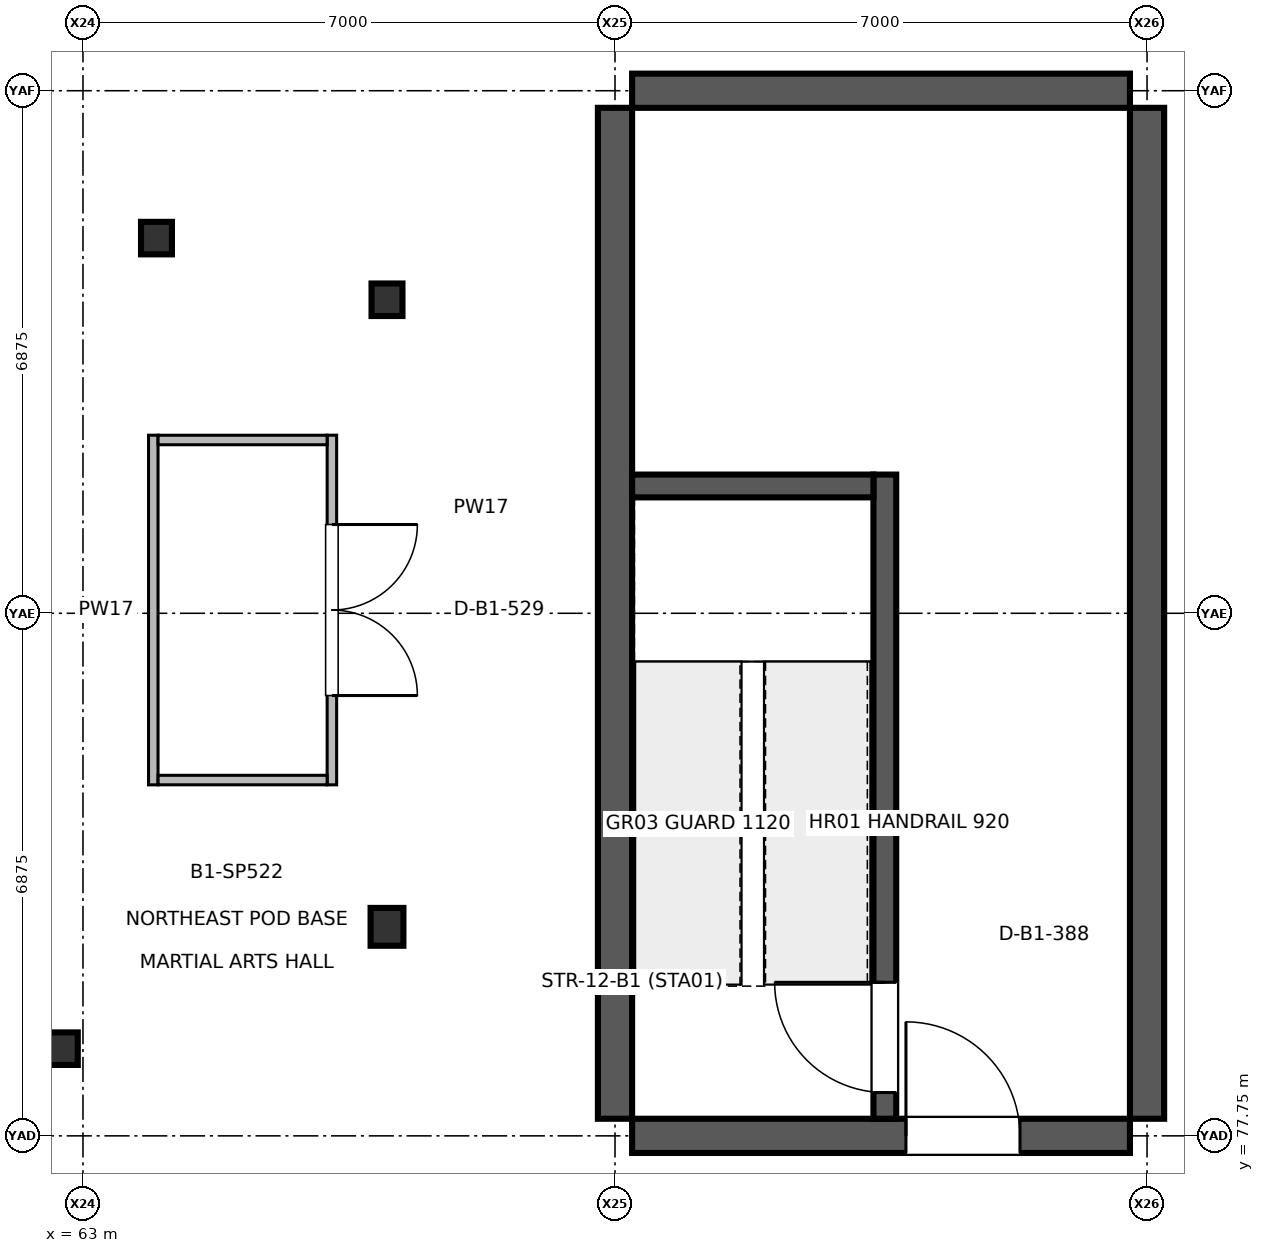
"""IFC4 building model, lengths in metres.
Left out: names, types, materials, properties, quantities, classifications, styles, units other than length and angle.
Written with IfcOpenShell. Run it as: python <this file> out.ifc"""

import sys

from ifc_helpers import new_model, si_unit, direction, frame, frame_2d, origin, origin_2d, place, context, subcontext, project, spatial, rectangle, i_section, extrude, element, fill, save


model = new_model("IFC4")
c1 = context("Model", 3, precision=1e-05, world=origin(), true_north=direction((0.0, 1.0)))
c2 = subcontext(c1, "Body", "Model", "MODEL_VIEW")
j1 = project(units=[si_unit("LENGTHUNIT", "METRE"), si_unit("PLANEANGLEUNIT", "RADIAN")], contexts=[c1])
p1 = place(None, origin())
s1 = spatial("IfcSite", under=j1, at=p1, CompositionType="ELEMENT")
p2 = place(p1, origin())
s2 = spatial("IfcBuilding", under=s1, at=p2, CompositionType="ELEMENT")
p3 = place(p2, frame((0.0, 0.0, -6.0)))
s3 = spatial("IfcBuildingStorey", under=s2, at=p3, CompositionType="ELEMENT", Elevation=-6.0)
p4 = place(p3, frame((67.0, 80.5, 0.0), z_axis=(0.0, 0.0, 1.0), x_axis=(1.0, 0.0, 0.0)))
e1 = element("IfcColumn", 1, at=p4, inside=s3, PredefinedType="COLUMN", context=c2, shape_type="SweptSolid", body=[
    extrude(i_section(OverallWidth=0.432, OverallDepth=0.498, WebThickness=0.024, FlangeThickness=0.038, at=origin_2d()), origin(), (0.0, 0.0, 1.0), 5.998),
])
p5 = place(p3, frame((67.0, 88.75, 0.0), z_axis=(0.0, 0.0, 1.0), x_axis=(1.0, 0.0, 0.0)))
e2 = element("IfcColumn", 2, at=p5, inside=s3, PredefinedType="COLUMN", context=c2, shape_type="SweptSolid", body=[
    extrude(i_section(OverallWidth=0.407, OverallDepth=0.428, WebThickness=0.02, FlangeThickness=0.035, at=origin_2d()), origin(), (0.0, 0.0, 1.0), 5.998),
])
for number, where, z_axis, x_axis in (
    (3, (63.967, 89.561, 0.0), (0.0, 0.0, 1.0), (1.0, 0.0, 0.0)),
    (4, (62.728, 78.897, 0.0), (0.0, 0.0, 1.0), (1.0, 0.0, 0.0)),
):
    element("IfcColumn", number, at=place(p3, frame(where, z_axis=z_axis, x_axis=x_axis)), inside=s3, PredefinedType="COLUMN", context=c2, shape_type="SweptSolid", body=[
        extrude(i_section(OverallWidth=0.407, OverallDepth=0.428, WebThickness=0.02, FlangeThickness=0.035, at=origin_2d()), origin(), (0.0, 0.0, 1.0), 5.718),
    ])
for number, where, z_axis, x_axis in (
    (5, (70.0, 77.975, 0.0), (0.0, 0.0, 1.0), (0.0, 1.0, 0.0)),
    (6, (77.0, 77.975, 0.0), (0.0, 0.0, 1.0), (0.0, 1.0, 0.0)),
):
    element("IfcWall", number, at=place(p3, frame(where, z_axis=z_axis, x_axis=x_axis)), inside=s3, PredefinedType="SHEAR", context=c2, shape_type="SweptSolid", body=[
        extrude(rectangle(XDim=13.3, YDim=0.45, at=frame_2d((6.65, 0.0))), origin(), (0.0, 0.0, 1.0), 5.72),
    ])
p6 = place(p3, frame((70.225, 77.75, 0.0), z_axis=(0.0, 0.0, 1.0), x_axis=(1.0, 0.0, 0.0)))
e7 = element("IfcWall", 7, at=p6, inside=s3, PredefinedType="SHEAR", context=c2, shape_type="SweptSolid", body=[
    extrude(rectangle(XDim=6.55, YDim=0.45, at=frame_2d((3.275, 0.0))), origin(), (0.0, 0.0, 1.0), 5.72),
])
p7 = place(p6, frame((3.603, 0.0, 0.0)))
e8 = element("IfcOpeningElement", 8, at=p7, cuts=e7, PredefinedType="OPENING", context=c2, shape_type="SweptSolid", body=[
    extrude(rectangle(XDim=1.5, YDim=2.2, at=frame_2d((0.75, 1.1))), frame((0.0, 0.235, 0.0), z_axis=(0.0, -1.0, 0.0), x_axis=(1.0, 0.0, 0.0)), (0.0, 0.0, 1.0), 0.47),
])
p8 = place(p3, frame((70.225, 91.5, 0.0), z_axis=(0.0, 0.0, 1.0), x_axis=(1.0, 0.0, 0.0)))
e9 = element("IfcWall", 9, at=p8, inside=s3, PredefinedType="SHEAR", context=c2, shape_type="SweptSolid", body=[
    extrude(rectangle(XDim=6.55, YDim=0.45, at=frame_2d((3.275, 0.0))), origin(), (0.0, 0.0, 1.0), 5.72),
])
p9 = place(p3, frame((73.55, 77.975, 0.0), z_axis=(0.0, 0.0, 1.0), x_axis=(0.0, 1.0, 0.0)))
e10 = element("IfcWall", 10, at=p9, inside=s3, PredefinedType="SHEAR", context=c2, shape_type="SweptSolid", body=[
    extrude(rectangle(XDim=8.475, YDim=0.3, at=frame_2d((4.237, 0.0))), origin(), (0.0, 0.0, 1.0), 5.72),
])
p10 = place(p9, frame((0.345, 0.0, 0.0)))
e11 = element("IfcOpeningElement", 11, at=p10, cuts=e10, PredefinedType="OPENING", context=c2, shape_type="SweptSolid", body=[
    extrude(rectangle(XDim=1.45, YDim=2.2, at=frame_2d((0.725, 1.1))), frame((0.0, 0.16, 0.0), z_axis=(0.0, -1.0, 0.0), x_axis=(1.0, 0.0, 0.0)), (0.0, 0.0, 1.0), 0.32),
])
p11 = place(p3, frame((66.275, 86.968, 0.0), z_axis=(0.0, 0.0, 1.0), x_axis=(0.0, -1.0, 0.0)))
e12 = element("IfcWall", 12, at=p11, inside=s3, PredefinedType="PARTITIONING", context=c2, shape_type="SweptSolid", body=[
    extrude(rectangle(XDim=4.6, YDim=0.125, at=frame_2d((2.3, 0.0))), origin(), (0.0, 0.0, 1.0), 5.02),
])
p12 = place(p11, frame((1.175, 0.0, 0.0)))
e13 = element("IfcOpeningElement", 13, at=p12, cuts=e12, PredefinedType="OPENING", context=c2, shape_type="SweptSolid", body=[
    extrude(rectangle(XDim=2.25, YDim=2.45, at=frame_2d((1.125, 1.225))), frame((0.0, 0.073, 0.0), z_axis=(0.0, -1.0, 0.0), x_axis=(1.0, 0.0, 0.0)), (0.0, 0.0, 1.0), 0.145),
])
p13 = place(p3, frame((63.925, 82.368, 0.0), z_axis=(0.0, 0.0, 1.0), x_axis=(0.0, 1.0, 0.0)))
e14 = element("IfcWall", 14, at=p13, inside=s3, PredefinedType="PARTITIONING", context=c2, shape_type="SweptSolid", body=[
    extrude(rectangle(XDim=4.6, YDim=0.125, at=frame_2d((2.3, 0.0))), origin(), (0.0, 0.0, 1.0), 5.02),
])
for number, where, z_axis, x_axis in (
    (15, (63.988, 82.431, 0.0), (0.0, 0.0, 1.0), (1.0, 0.0, 0.0)),
    (16, (63.988, 86.905, 0.0), (0.0, 0.0, 1.0), (1.0, 0.0, 0.0)),
):
    element("IfcWall", number, at=place(p3, frame(where, z_axis=z_axis, x_axis=x_axis)), inside=s3, PredefinedType="PARTITIONING", context=c2, shape_type="SweptSolid", body=[
        extrude(rectangle(XDim=2.224, YDim=0.125, at=frame_2d((1.112, 0.0))), origin(), (0.0, 0.0, 1.0), 5.02),
    ])
p14 = place(p3, frame((70.225, 86.3, 0.0), z_axis=(0.0, 0.0, 1.0), x_axis=(1.0, 0.0, 0.0)))
e17 = element("IfcWall", 17, at=p14, inside=s3, PredefinedType="SHEAR", context=c2, shape_type="SweptSolid", body=[
    extrude(rectangle(XDim=3.175, YDim=0.3, at=frame_2d((1.587, 0.0))), origin(), (0.0, 0.0, 1.0), 5.72),
])
p15 = place(p7, origin())
e18 = element("IfcDoor", 18, at=p15, inside=s3, OperationType="SINGLE_SWING_LEFT", PredefinedType="DOOR", context=c2, shape_type="SweptSolid", body=[
    extrude(rectangle(XDim=1.5, YDim=2.2, at=frame_2d((0.75, 1.1))), frame((0.0, 0.025, 0.0), z_axis=(0.0, -1.0, 0.0), x_axis=(1.0, 0.0, 0.0)), (0.0, 0.0, 1.0), 0.05),
])
fill(e8, e18)
p16 = place(p10, origin())
e19 = element("IfcDoor", 19, at=p16, inside=s3, OperationType="SINGLE_SWING_RIGHT", PredefinedType="DOOR", context=c2, shape_type="SweptSolid", body=[
    extrude(rectangle(XDim=1.45, YDim=2.2, at=frame_2d((0.725, 1.1))), frame((0.0, 0.025, 0.0), z_axis=(0.0, -1.0, 0.0), x_axis=(1.0, 0.0, 0.0)), (0.0, 0.0, 1.0), 0.05),
])
fill(e11, e19)
p17 = place(p12, origin())
e20 = element("IfcDoor", 20, at=p17, inside=s3, OperationType="DOUBLE_DOOR_SINGLE_SWING", PredefinedType="DOOR", context=c2, shape_type="SweptSolid", body=[
    extrude(rectangle(XDim=2.25, YDim=2.45, at=frame_2d((1.125, 1.225))), frame((0.0, 0.025, 0.0), z_axis=(0.0, -1.0, 0.0), x_axis=(1.0, 0.0, 0.0)), (0.0, 0.0, 1.0), 0.05),
])
fill(e13, e20)
save(model, sys.argv[1])
